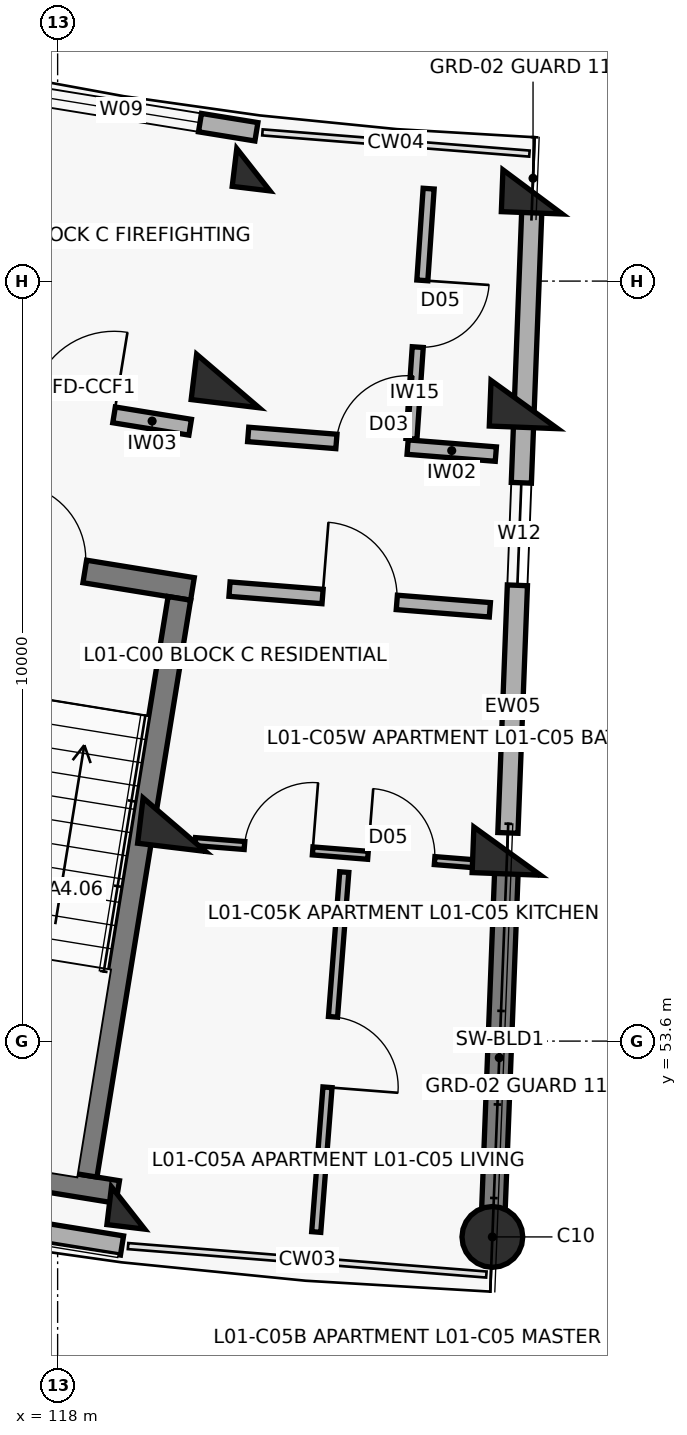
"""IFC4 building model, lengths in metres.
Left out: names, types, materials, properties, quantities, classifications, styles, units other than length and angle.
Written with IfcOpenShell. Run it as: python <this file> out.ifc"""

import sys

from ifc_helpers import new_model, si_unit, direction, frame, frame_2d, origin, origin_2d, place, context, subcontext, project, spatial, rectangle, circle, extrude, element, fill, save


model = new_model("IFC4")
c1 = context("Model", 3, precision=1e-05, world=origin(), true_north=direction((0.0, 1.0)))
c2 = subcontext(c1, "Body", "Model", "MODEL_VIEW")
j1 = project(units=[si_unit("LENGTHUNIT", "METRE"), si_unit("PLANEANGLEUNIT", "RADIAN")], contexts=[c1])
p1 = place(None, origin())
s1 = spatial("IfcSite", under=j1, at=p1, CompositionType="ELEMENT")
p2 = place(p1, origin())
s2 = spatial("IfcBuilding", under=s1, at=p2, CompositionType="ELEMENT")
p3 = place(p2, frame((0.0, 0.0, 4.5)))
s3 = spatial("IfcBuildingStorey", under=s2, at=p3, CompositionType="ELEMENT", Elevation=4.5)
p4 = place(p3, frame((120.575, 65.065, 0.0), z_axis=(0.0, 0.0, 1.0), x_axis=(-0.119790293837, -0.992799217114, 0.0)))
e1 = element("IfcColumn", 1, at=p4, inside=s3, PredefinedType="COLUMN", context=c2, shape_type="SweptSolid", body=[
    extrude(rectangle(XDim=0.5, YDim=0.5, at=origin_2d()), origin(), (0.0, 0.0, 1.0), 3.6),
])
for number, where, z_axis, x_axis in (
    (2, (120.24, 62.285, 0.0), (0.0, 0.0, 1.0), (-0.12, -0.993, 0.0)),
    (3, (119.535, 56.448, 0.0), (0.0, 0.0, 1.0), (-0.12, -0.993, 0.0)),
):
    element("IfcColumn", number, at=place(p3, frame(where, z_axis=z_axis, x_axis=x_axis)), inside=s3, PredefinedType="COLUMN", context=c2, shape_type="SweptSolid", body=[
        extrude(rectangle(XDim=0.6, YDim=0.9, at=origin_2d()), origin(), (0.0, 0.0, 1.0), 3.6),
    ])
p5 = place(p3, frame((118.927, 51.404, 0.0), z_axis=(0.0, 0.0, 1.0), x_axis=(-0.119790293837, -0.992799217114, 0.0)))
e4 = element("IfcColumn", 4, at=p5, inside=s3, PredefinedType="COLUMN", context=c2, shape_type="SweptSolid", body=[
    extrude(rectangle(XDim=0.5, YDim=0.5, at=origin_2d()), origin(), (0.0, 0.0, 1.0), 3.6),
])
p6 = place(p3, frame((124.248, 64.773, 0.0), z_axis=(0.0, 0.0, 1.0), x_axis=(-0.038387809088, -0.999262916411, 0.0)))
e5 = element("IfcColumn", 5, at=p6, inside=s3, PredefinedType="COLUMN", context=c2, shape_type="SweptSolid", body=[
    extrude(rectangle(XDim=0.55, YDim=0.8, at=origin_2d()), origin(), (0.0, 0.0, 1.0), 3.6),
])
for number, where, z_axis, x_axis in (
    (6, (124.14, 61.975, 0.0), (0.0, 0.0, 1.0), (-0.038, -0.999, 0.0)),
    (7, (123.915, 56.1, 0.0), (0.0, 0.0, 1.0), (-0.038, -0.999, 0.0)),
):
    element("IfcColumn", number, at=place(p3, frame(where, z_axis=z_axis, x_axis=x_axis)), inside=s3, PredefinedType="COLUMN", context=c2, shape_type="SweptSolid", body=[
        extrude(rectangle(XDim=0.6, YDim=0.9, at=origin_2d()), origin(), (0.0, 0.0, 1.0), 3.6),
    ])
p7 = place(p3, frame((123.72, 51.023, 0.0), z_axis=(0.0, 0.0, 1.0), x_axis=(-0.038387809088, -0.999262916411, 0.0)))
e8 = element("IfcColumn", 8, at=p7, inside=s3, PredefinedType="COLUMN", context=c2, shape_type="SweptSolid", body=[
    extrude(circle(Radius=0.4, at=origin_2d()), origin(), (0.0, 0.0, 1.0), 3.6),
])
p8 = place(p3, frame((123.908, 55.92, 0.0), z_axis=(0.0, 0.0, 1.0), x_axis=(-0.038381471406, -0.99926315986, 0.0)))
e9 = element("IfcWall", 9, at=p8, inside=s3, PredefinedType="SHEAR", context=c2, shape_type="SweptSolid", body=[
    extrude(rectangle(XDim=4.72, YDim=0.31, at=frame_2d((2.36, 0.0))), origin(), (0.0, 0.0, 1.0), 3.36),
])
p9 = place(p3, frame((114.1, 51.681, 0.0), z_axis=(0.0, 0.0, 1.0), x_axis=(0.987080750493, -0.160223568819, 0.0)))
e10 = element("IfcWall", 10, at=p9, inside=s3, PredefinedType="SOLIDWALL", context=c2, shape_type="SweptSolid", body=[
    extrude(rectangle(XDim=4.809, YDim=0.255, at=frame_2d((2.404, 0.0))), origin(), (0.0, 0.0, 1.0), 2.6),
])
p10 = place(p3, frame((117.058, 66.142, 0.0), z_axis=(0.0, 0.0, 1.0), x_axis=(0.987080874485, -0.160222804952, 0.0)))
e11 = element("IfcWall", 11, at=p10, inside=s3, PredefinedType="SOLIDWALL", context=c2, shape_type="SweptSolid", body=[
    extrude(rectangle(XDim=3.604, YDim=0.245, at=frame_2d((1.802, 0.0))), origin(), (0.0, 0.0, 1.0), 2.6),
])
p11 = place(p10, frame((0.752, 0.0, 0.32)))
e12 = element("IfcOpeningElement", 12, at=p11, cuts=e11, PredefinedType="OPENING", context=c2, shape_type="SweptSolid", body=[
    extrude(rectangle(XDim=2.1, YDim=1.65, at=frame_2d((1.05, 0.825))), frame((0.0, 0.133, 0.0), z_axis=(0.0, -1.0, 0.0), x_axis=(1.0, 0.0, 0.0)), (0.0, 0.0, 1.0), 0.265),
])
p12 = place(p3, frame((124.239, 64.533, 0.0), z_axis=(0.0, 0.0, 1.0), x_axis=(-0.038407966241, -0.999262141847, 0.0)))
e13 = element("IfcWall", 13, at=p12, inside=s3, PredefinedType="SOLIDWALL", context=c2, shape_type="SweptSolid", body=[
    extrude(rectangle(XDim=8.2, YDim=0.265, at=frame_2d((4.1, 0.0))), origin(), (0.0, 0.0, 1.0), 2.58),
])
p13 = place(p12, frame((3.59, 0.0, 0.75)))
e14 = element("IfcOpeningElement", 14, at=p13, cuts=e13, PredefinedType="OPENING", context=c2, shape_type="SweptSolid", body=[
    extrude(rectangle(XDim=1.35, YDim=1.35, at=frame_2d((0.675, 0.675))), frame((0.0, 0.142, 0.0), z_axis=(0.0, -1.0, 0.0), x_axis=(1.0, 0.0, 0.0)), (0.0, 0.0, 1.0), 0.285),
])
p14 = place(p3, frame((115.954, 60.169, 0.0), z_axis=(0.0, 0.0, 1.0), x_axis=(0.987077443397, -0.160243941341, 0.0)))
e15 = element("IfcWall", 15, at=p14, inside=s3, PredefinedType="SHEAR", context=c2, shape_type="SweptSolid", body=[
    extrude(rectangle(XDim=3.87, YDim=0.3, at=frame_2d((1.935, 0.0))), origin(), (0.0, 0.0, 1.0), 3.6),
])
p15 = place(p14, frame((1.435, 0.0, 0.0)))
e16 = element("IfcOpeningElement", 16, at=p15, cuts=e15, PredefinedType="OPENING", context=c2, shape_type="SweptSolid", body=[
    extrude(rectangle(XDim=1.0, YDim=2.15, at=frame_2d((0.5, 1.075))), frame((0.0, 0.16, 0.0), z_axis=(0.0, -1.0, 0.0), x_axis=(1.0, 0.0, 0.0)), (0.0, 0.0, 1.0), 0.32),
])
p16 = place(p3, frame((114.377, 52.331, 0.0), z_axis=(0.0, 0.0, 1.0), x_axis=(0.987077474317, -0.16024375088, 0.0)))
e17 = element("IfcWall", 17, at=p16, inside=s3, PredefinedType="SHEAR", context=c2, shape_type="SweptSolid", body=[
    extrude(rectangle(XDim=4.47, YDim=0.3, at=frame_2d((2.235, 0.0))), origin(), (0.0, 0.0, 1.0), 3.6),
])
p17 = place(p3, frame((119.602, 59.425, 0.0), z_axis=(0.0, 0.0, 1.0), x_axis=(-0.160201584773, -0.987084318706, 0.0)))
e18 = element("IfcWall", 18, at=p17, inside=s3, PredefinedType="SHEAR", context=c2, shape_type="SweptSolid", body=[
    extrude(rectangle(XDim=7.69, YDim=0.3, at=frame_2d((3.845, 0.0))), origin(), (0.0, 0.0, 1.0), 3.6),
])
p18 = place(p3, frame((116.656, 62.178, 0.0), z_axis=(0.0, 0.0, 1.0), x_axis=(0.987083140276, -0.16020884552, 0.0)))
e19 = element("IfcWall", 19, at=p18, inside=s3, PredefinedType="SOLIDWALL", context=c2, shape_type="SweptSolid", body=[
    extrude(rectangle(XDim=3.129, YDim=0.21, at=frame_2d((1.564, 0.0))), origin(), (0.0, 0.0, 1.0), 2.58),
])
p19 = place(p18, frame((1.014, 0.0, 0.0)))
e20 = element("IfcOpeningElement", 20, at=p19, cuts=e19, PredefinedType="OPENING", context=c2, shape_type="SweptSolid", body=[
    extrude(rectangle(XDim=1.1, YDim=2.15, at=frame_2d((0.55, 1.075))), frame((0.0, 0.115, 0.0), z_axis=(0.0, -1.0, 0.0), x_axis=(1.0, 0.0, 0.0)), (0.0, 0.0, 1.0), 0.23),
])
p20 = place(p3, frame((120.261, 59.547, 0.0), z_axis=(0.0, 0.0, 1.0), x_axis=(0.996862545573, -0.079152165058, 0.0)))
e21 = element("IfcWall", 21, at=p20, inside=s3, PredefinedType="SOLIDWALL", context=c2, shape_type="SweptSolid", body=[
    extrude(rectangle(XDim=3.436, YDim=0.19, at=frame_2d((1.718, 0.0))), origin(), (0.0, 0.0, 1.0), 2.58),
])
p21 = place(p20, frame((1.228, 0.0, 0.0)))
e22 = element("IfcOpeningElement", 22, at=p21, cuts=e21, PredefinedType="OPENING", context=c2, shape_type="SweptSolid", body=[
    extrude(rectangle(XDim=0.98, YDim=2.15, at=frame_2d((0.49, 1.075))), frame((0.0, 0.105, 0.0), z_axis=(0.0, -1.0, 0.0), x_axis=(1.0, 0.0, 0.0)), (0.0, 0.0, 1.0), 0.21),
])
p22 = place(p3, frame((120.507, 61.582, 0.0), z_axis=(0.0, 0.0, 1.0), x_axis=(0.996860715473, -0.07917521043, 0.0)))
e23 = element("IfcWall", 23, at=p22, inside=s3, PredefinedType="SOLIDWALL", context=c2, shape_type="SweptSolid", body=[
    extrude(rectangle(XDim=3.269, YDim=0.19, at=frame_2d((1.634, 0.0))), origin(), (0.0, 0.0, 1.0), 2.58),
])
p23 = place(p22, frame((1.164, 0.0, 0.0)))
e24 = element("IfcOpeningElement", 24, at=p23, cuts=e23, PredefinedType="OPENING", context=c2, shape_type="SweptSolid", body=[
    extrude(rectangle(XDim=0.94, YDim=2.1, at=frame_2d((0.47, 1.05))), frame((0.0, 0.105, 0.0), z_axis=(0.0, -1.0, 0.0), x_axis=(1.0, 0.0, 0.0)), (0.0, 0.0, 1.0), 0.21),
])
p24 = place(p3, frame((122.881, 64.816, 0.0), z_axis=(0.0, 0.0, 1.0), x_axis=(-0.068581194944, -0.997645538105, 0.0)))
e25 = element("IfcWall", 25, at=p24, inside=s3, PredefinedType="PARTITIONING", context=c2, shape_type="SweptSolid", body=[
    extrude(rectangle(XDim=3.3, YDim=0.145, at=frame_2d((1.65, 0.0))), origin(), (0.0, 0.0, 1.0), 2.58),
])
p25 = place(p24, frame((1.21, 0.0, 0.0)))
e26 = element("IfcOpeningElement", 26, at=p25, cuts=e25, PredefinedType="OPENING", context=c2, shape_type="SweptSolid", body=[
    extrude(rectangle(XDim=0.88, YDim=2.1, at=frame_2d((0.44, 1.05))), frame((0.0, 0.083, 0.0), z_axis=(0.0, -1.0, 0.0), x_axis=(1.0, 0.0, 0.0)), (0.0, 0.0, 1.0), 0.165),
])
p26 = place(p3, frame((119.81, 56.225, 0.0), z_axis=(0.0, 0.0, 1.0), x_axis=(0.996862985267, -0.079146627246, 0.0)))
e27 = element("IfcWall", 27, at=p26, inside=s3, PredefinedType="PARTITIONING", context=c2, shape_type="SweptSolid", body=[
    extrude(rectangle(XDim=3.81, YDim=0.105, at=frame_2d((1.905, 0.0))), origin(), (0.0, 0.0, 1.0), 2.58),
])
p27 = place(p26, frame((0.65, 0.0, 0.0)))
e28 = element("IfcOpeningElement", 28, at=p27, cuts=e27, PredefinedType="OPENING", context=c2, shape_type="SweptSolid", body=[
    extrude(rectangle(XDim=0.9, YDim=2.1, at=frame_2d((0.45, 1.05))), frame((0.0, 0.062, 0.0), z_axis=(0.0, -1.0, 0.0), x_axis=(1.0, 0.0, 0.0)), (0.0, 0.0, 1.0), 0.125),
])
p28 = place(p26, frame((2.28, 0.0, 0.0)))
e29 = element("IfcOpeningElement", 29, at=p28, cuts=e27, PredefinedType="OPENING", context=c2, shape_type="SweptSolid", body=[
    extrude(rectangle(XDim=0.88, YDim=2.1, at=frame_2d((0.44, 1.05))), frame((0.0, 0.062, 0.0), z_axis=(0.0, -1.0, 0.0), x_axis=(1.0, 0.0, 0.0)), (0.0, 0.0, 1.0), 0.125),
])
p29 = place(p3, frame((121.771, 55.824, 0.0), z_axis=(0.0, 0.0, 1.0), x_axis=(-0.077659382624, -0.996979949794, 0.0)))
e30 = element("IfcWall", 30, at=p29, inside=s3, PredefinedType="PARTITIONING", context=c2, shape_type="SweptSolid", body=[
    extrude(rectangle(XDim=4.75, YDim=0.12, at=frame_2d((2.375, 0.0))), origin(), (0.0, 0.0, 1.0), 2.58),
])
p30 = place(p29, frame((1.91, 0.0, 0.0)))
e31 = element("IfcOpeningElement", 31, at=p30, cuts=e30, PredefinedType="OPENING", context=c2, shape_type="SweptSolid", body=[
    extrude(rectangle(XDim=0.93, YDim=2.1, at=frame_2d((0.465, 1.05))), frame((0.0, 0.07, 0.0), z_axis=(0.0, -1.0, 0.0), x_axis=(1.0, 0.0, 0.0)), (0.0, 0.0, 1.0), 0.14),
])
p31 = place(p11, origin())
e32 = element("IfcWindow", 32, at=p31, inside=s3, PartitioningType="TRIPLE_PANEL_VERTICAL", PredefinedType="WINDOW", context=c2, shape_type="SweptSolid", body=[
    extrude(rectangle(XDim=2.1, YDim=1.65, at=frame_2d((1.05, 0.825))), frame((0.0, 0.03, 0.0), z_axis=(0.0, -1.0, 0.0), x_axis=(1.0, 0.0, 0.0)), (0.0, 0.0, 1.0), 0.06),
])
fill(e12, e32)
p32 = place(p13, origin())
e33 = element("IfcWindow", 33, at=p32, inside=s3, PartitioningType="DOUBLE_PANEL_VERTICAL", PredefinedType="WINDOW", context=c2, shape_type="SweptSolid", body=[
    extrude(rectangle(XDim=1.35, YDim=1.35, at=frame_2d((0.675, 0.675))), frame((0.0, 0.03, 0.0), z_axis=(0.0, -1.0, 0.0), x_axis=(1.0, 0.0, 0.0)), (0.0, 0.0, 1.0), 0.06),
])
fill(e14, e33)
p33 = place(p15, origin())
e34 = element("IfcDoor", 34, at=p33, inside=s3, OperationType="SINGLE_SWING_LEFT", PredefinedType="DOOR", context=c2, shape_type="SweptSolid", body=[
    extrude(rectangle(XDim=1.0, YDim=2.15, at=frame_2d((0.5, 1.075))), frame((0.0, 0.025, 0.0), z_axis=(0.0, -1.0, 0.0), x_axis=(1.0, 0.0, 0.0)), (0.0, 0.0, 1.0), 0.05),
])
fill(e16, e34)
p34 = place(p19, origin())
e35 = element("IfcDoor", 35, at=p34, inside=s3, OperationType="SINGLE_SWING_RIGHT", PredefinedType="DOOR", context=c2, shape_type="SweptSolid", body=[
    extrude(rectangle(XDim=1.1, YDim=2.15, at=frame_2d((0.55, 1.075))), frame((0.0, 0.025, 0.0), z_axis=(0.0, -1.0, 0.0), x_axis=(1.0, 0.0, 0.0)), (0.0, 0.0, 1.0), 0.05),
])
fill(e20, e35)
p35 = place(p21, origin())
e36 = element("IfcDoor", 36, at=p35, inside=s3, OperationType="SINGLE_SWING_LEFT", PredefinedType="DOOR", context=c2, shape_type="SweptSolid", body=[
    extrude(rectangle(XDim=0.98, YDim=2.15, at=frame_2d((0.49, 1.075))), frame((0.0, 0.025, 0.0), z_axis=(0.0, -1.0, 0.0), x_axis=(1.0, 0.0, 0.0)), (0.0, 0.0, 1.0), 0.05),
])
fill(e22, e36)
p36 = place(p23, origin())
e37 = element("IfcDoor", 37, at=p36, inside=s3, OperationType="SINGLE_SWING_RIGHT", PredefinedType="DOOR", context=c2, shape_type="SweptSolid", body=[
    extrude(rectangle(XDim=0.94, YDim=2.1, at=frame_2d((0.47, 1.05))), frame((0.0, 0.025, 0.0), z_axis=(0.0, -1.0, 0.0), x_axis=(1.0, 0.0, 0.0)), (0.0, 0.0, 1.0), 0.05),
])
fill(e24, e37)
p37 = place(p25, origin())
e38 = element("IfcDoor", 38, at=p37, inside=s3, OperationType="SINGLE_SWING_LEFT", PredefinedType="DOOR", context=c2, shape_type="SweptSolid", body=[
    extrude(rectangle(XDim=0.88, YDim=2.1, at=frame_2d((0.44, 1.05))), frame((0.0, 0.025, 0.0), z_axis=(0.0, -1.0, 0.0), x_axis=(1.0, 0.0, 0.0)), (0.0, 0.0, 1.0), 0.05),
])
fill(e26, e38)
p38 = place(p27, origin())
e39 = element("IfcDoor", 39, at=p38, inside=s3, OperationType="SINGLE_SWING_RIGHT", PredefinedType="DOOR", context=c2, shape_type="SweptSolid", body=[
    extrude(rectangle(XDim=0.9, YDim=2.1, at=frame_2d((0.45, 1.05))), frame((0.0, 0.025, 0.0), z_axis=(0.0, -1.0, 0.0), x_axis=(1.0, 0.0, 0.0)), (0.0, 0.0, 1.0), 0.05),
])
fill(e28, e39)
p39 = place(p28, origin())
e40 = element("IfcDoor", 40, at=p39, inside=s3, OperationType="SINGLE_SWING_LEFT", PredefinedType="DOOR", context=c2, shape_type="SweptSolid", body=[
    extrude(rectangle(XDim=0.88, YDim=2.1, at=frame_2d((0.44, 1.05))), frame((0.0, 0.025, 0.0), z_axis=(0.0, -1.0, 0.0), x_axis=(1.0, 0.0, 0.0)), (0.0, 0.0, 1.0), 0.05),
])
fill(e29, e40)
p40 = place(p30, origin())
e41 = element("IfcDoor", 41, at=p40, inside=s3, OperationType="SINGLE_SWING_RIGHT", PredefinedType="DOOR", context=c2, shape_type="SweptSolid", body=[
    extrude(rectangle(XDim=0.93, YDim=2.1, at=frame_2d((0.465, 1.05))), frame((0.0, 0.025, 0.0), z_axis=(0.0, -1.0, 0.0), x_axis=(1.0, 0.0, 0.0)), (0.0, 0.0, 1.0), 0.05),
])
fill(e31, e41)
save(model, sys.argv[1])
